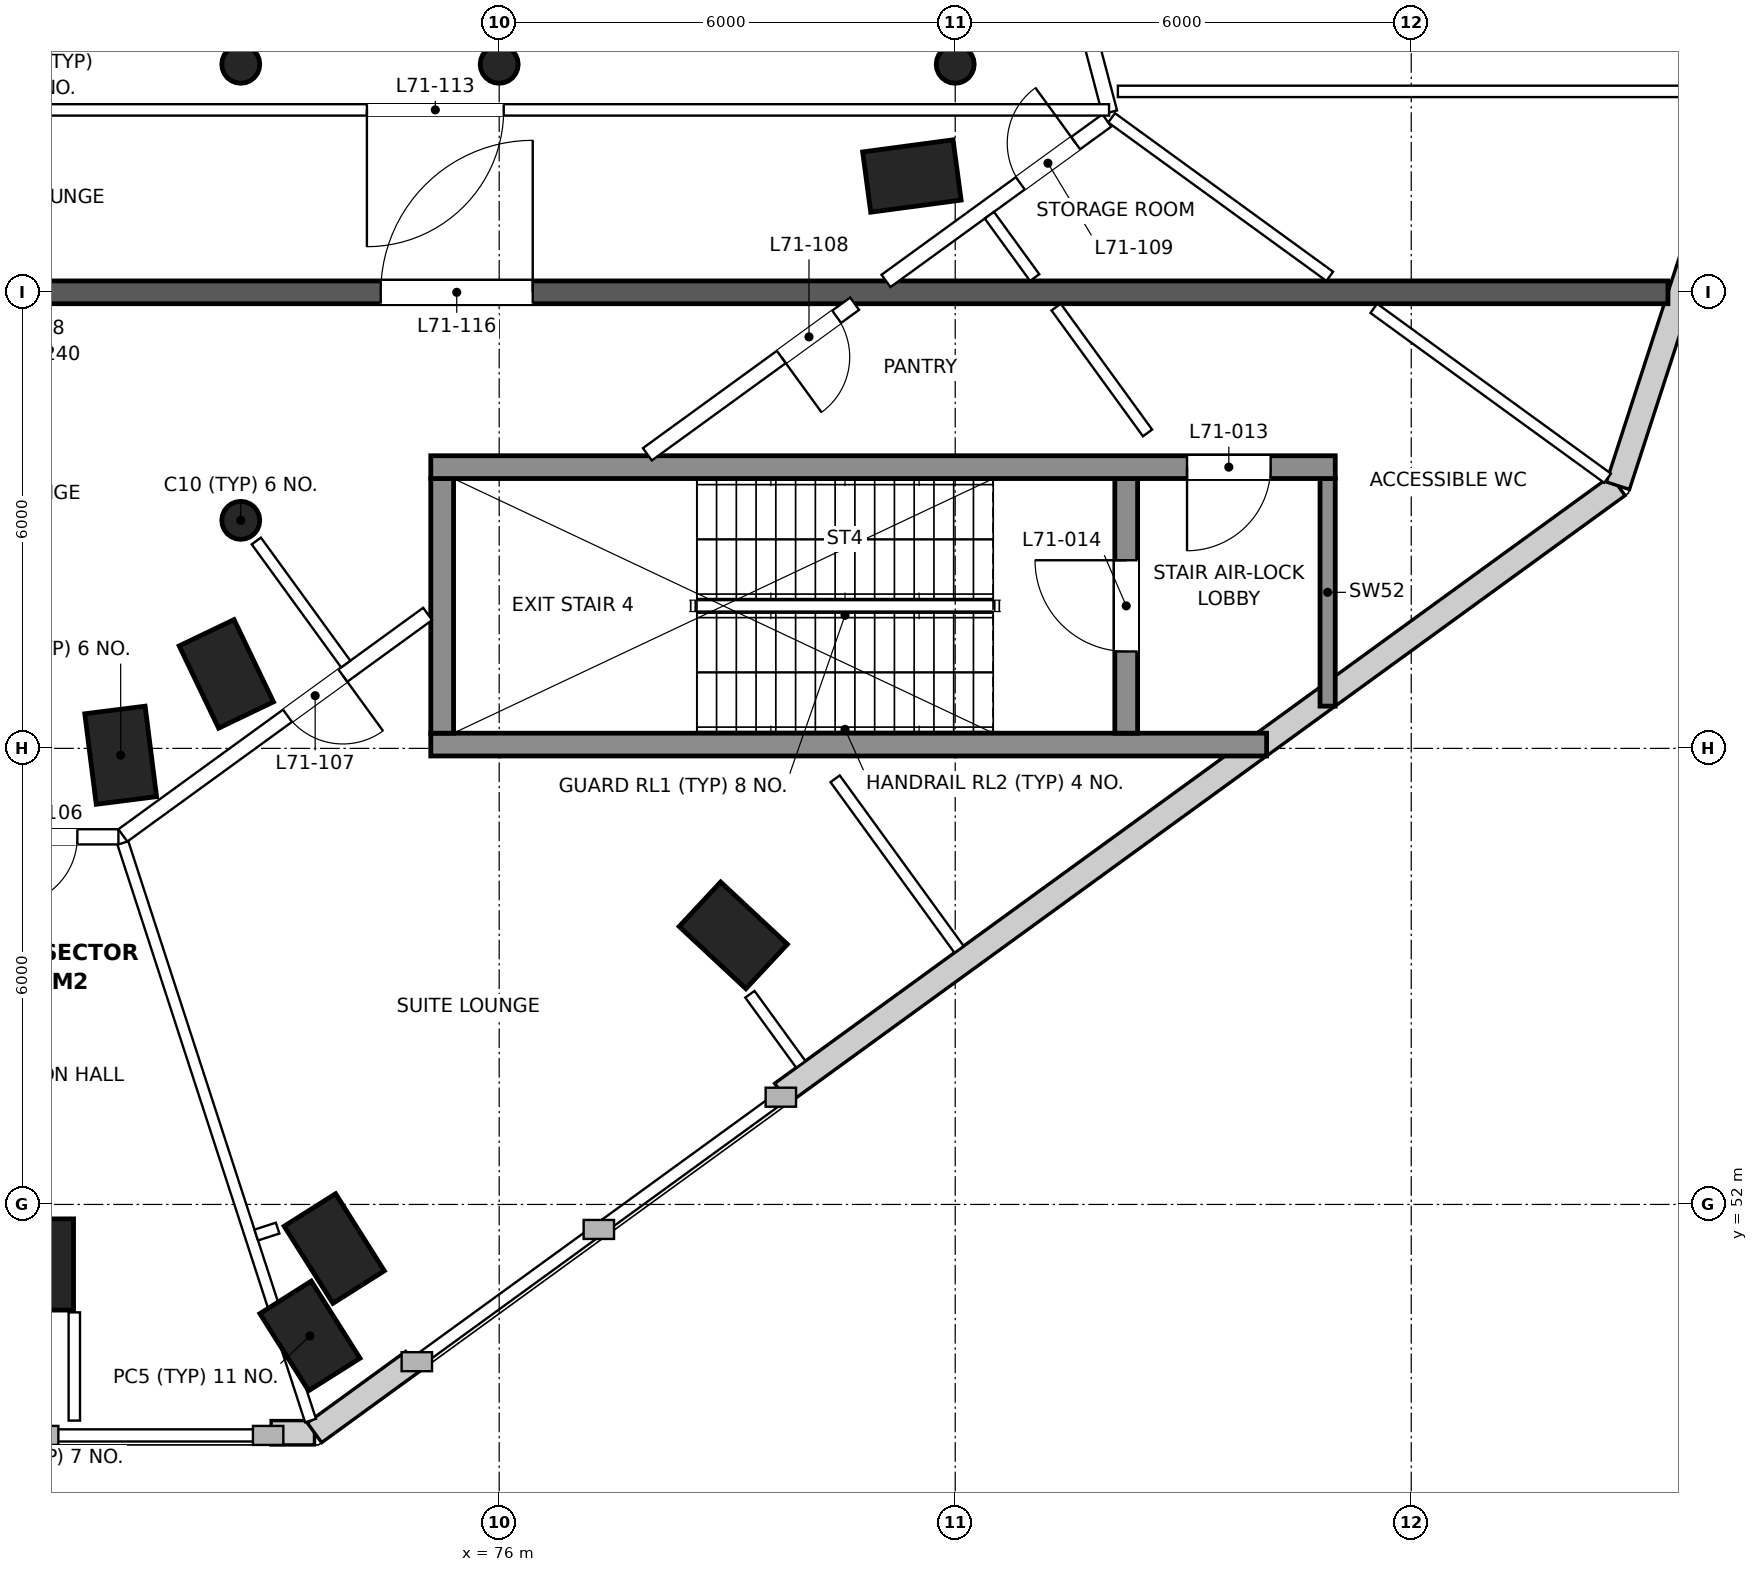
"""IFC4 building model, lengths in metres.
Left out: names, types, materials, properties, quantities, classifications, styles, units other than length and angle.
Written with IfcOpenShell. Run it as: python <this file> out.ifc"""

import sys

from ifc_helpers import new_model, si_unit, direction, frame, frame_2d, origin, origin_2d, place, context, subcontext, project, spatial, rectangle, circle, extrude, element, fill, save


model = new_model("IFC4")
c1 = context("Model", 3, precision=1e-05, world=origin(), true_north=direction((0.0, 1.0)))
c2 = subcontext(c1, "Body", "Model", "MODEL_VIEW")
j1 = project(units=[si_unit("LENGTHUNIT", "METRE"), si_unit("PLANEANGLEUNIT", "RADIAN")], contexts=[c1])
p1 = place(None, origin())
s1 = spatial("IfcSite", under=j1, at=p1, CompositionType="ELEMENT")
p2 = place(p1, origin())
s2 = spatial("IfcBuilding", under=s1, at=p2, CompositionType="ELEMENT")
p3 = place(p2, frame((0.0, 0.0, 300.1)))
s3 = spatial("IfcBuildingStorey", under=s2, at=p3, CompositionType="ELEMENT", Elevation=300.1)
for number, where, z_axis, x_axis in (
    (1, (70.0, 51.21, 0.0), (0.0, 0.0, 1.0), (-1.0, 0.0, 0.0)),
    (2, (73.51, 50.27, 0.0), (0.0, 0.0, 1.0), (-0.845, -0.534, 0.0)),
    (3, (73.83, 51.42, 0.0), (0.0, 0.0, 1.0), (-0.845, -0.534, 0.0)),
    (4, (79.08, 55.54, 0.0), (0.0, 0.0, 1.0), (-0.682, -0.731, 0.0)),
    (5, (71.02, 57.91, 0.0), (0.0, 0.0, 1.0), (-0.992, -0.126, 0.0)),
    (6, (72.41, 58.98, 0.0), (0.0, 0.0, 1.0), (-0.902, -0.432, 0.0)),
    (7, (81.43, 65.53, 0.0), (0.0, 0.0, 1.0), (0.133, -0.991, 0.0)),
):
    element("IfcColumn", number, at=place(p3, frame(where, z_axis=z_axis, x_axis=x_axis)), inside=s3, PredefinedType="COLUMN", context=c2, shape_type="SweptSolid", body=[
        extrude(rectangle(XDim=0.8, YDim=1.2, at=origin_2d()), origin(), (0.0, 0.0, 1.0), 6.0),
    ])
for number, where, z_axis, x_axis in (
    (8, (72.6, 61.0, 0.0), (0.0, 0.0, 1.0), (1.0, 0.0, 0.0)),
    (9, (72.6, 67.0, 0.0), (0.0, 0.0, 1.0), (1.0, 0.0, 0.0)),
    (10, (76.0, 67.0, 0.0), (0.0, 0.0, 1.0), (1.0, 0.0, 0.0)),
    (11, (82.0, 67.0, 0.0), (0.0, 0.0, 1.0), (1.0, 0.0, 0.0)),
):
    element("IfcColumn", number, at=place(p3, frame(where, z_axis=z_axis, x_axis=x_axis)), inside=s3, PredefinedType="COLUMN", context=c2, shape_type="SweptSolid", body=[
        extrude(circle(Radius=0.25, at=origin_2d()), origin(), (0.0, 0.0, 1.0), 6.0),
    ])
p4 = place(p3, frame((73.0, 48.996, 0.0), z_axis=(0.0, 0.0, 1.0), x_axis=(1.0, 0.0, 0.0)))
e12 = element("IfcWall", 12, at=p4, inside=s3, PredefinedType="SOLIDWALL", context=c2, shape_type="SweptSolid", body=[
    extrude(rectangle(XDim=0.57, YDim=0.32, at=frame_2d((0.285, 0.0))), origin(), (0.0, 0.0, 1.0), 5.7),
])
p5 = place(p3, frame((73.57, 48.996, 0.0), z_axis=(0.0, 0.0, 1.0), x_axis=(0.809033137517, 0.587763032522, 0.0)))
e13 = element("IfcWall", 13, at=p5, inside=s3, PredefinedType="SOLIDWALL", context=c2, shape_type="SweptSolid", body=[
    extrude(rectangle(XDim=1.599, YDim=0.32, at=frame_2d((0.799, 0.0))), origin(), (0.0, 0.0, 1.0), 5.7),
])
p6 = place(p3, frame((79.718, 53.463, 0.0), z_axis=(0.0, 0.0, 1.0), x_axis=(0.809018581772, 0.587783067422, 0.0)))
e14 = element("IfcWall", 14, at=p6, inside=s3, PredefinedType="SOLIDWALL", context=c2, shape_type="SweptSolid", body=[
    extrude(rectangle(XDim=13.599, YDim=0.32, at=frame_2d((6.799, 0.0))), origin(), (0.0, 0.0, 1.0), 5.7),
])
p7 = place(p3, frame((90.719, 61.456, 0.0), z_axis=(0.0, 0.0, 1.0), x_axis=(0.30900814357, 0.951059392051, 0.0)))
e15 = element("IfcWall", 15, at=p7, inside=s3, PredefinedType="SOLIDWALL", context=c2, shape_type="SweptSolid", body=[
    extrude(rectangle(XDim=5.455, YDim=0.32, at=frame_2d((2.727, 0.0))), origin(), (0.0, 0.0, 1.0), 5.7),
])
p8 = place(p3, frame((75.1, 58.05, 0.0), z_axis=(0.0, 0.0, 1.0), x_axis=(1.0, 0.0, 0.0)))
e16 = element("IfcWall", 16, at=p8, inside=s3, PredefinedType="SHEAR", context=c2, shape_type="SweptSolid", body=[
    extrude(rectangle(XDim=10.997, YDim=0.3, at=frame_2d((5.499, 0.0))), origin(), (0.0, 0.0, 1.0), 6.0),
])
p9 = place(p3, frame((75.25, 58.2, 0.0), z_axis=(0.0, 0.0, 1.0), x_axis=(0.0, 1.0, 0.0)))
e17 = element("IfcWall", 17, at=p9, inside=s3, PredefinedType="SHEAR", context=c2, shape_type="SweptSolid", body=[
    extrude(rectangle(XDim=3.35, YDim=0.3, at=frame_2d((1.675, 0.0))), origin(), (0.0, 0.0, 1.0), 6.0),
])
p10 = place(p3, frame((84.25, 58.2, 0.0), z_axis=(0.0, 0.0, 1.0), x_axis=(0.0, 1.0, 0.0)))
e18 = element("IfcWall", 18, at=p10, inside=s3, PredefinedType="SHEAR", context=c2, shape_type="SweptSolid", body=[
    extrude(rectangle(XDim=3.35, YDim=0.3, at=frame_2d((1.675, 0.0))), origin(), (0.0, 0.0, 1.0), 6.0),
])
p11 = place(p10, frame((1.075, 0.0, 0.0)))
e19 = element("IfcOpeningElement", 19, at=p11, cuts=e18, PredefinedType="OPENING", context=c2, shape_type="SweptSolid", body=[
    extrude(rectangle(XDim=1.2, YDim=2.1, at=frame_2d((0.6, 1.05))), frame((0.0, 0.16, 0.0), z_axis=(0.0, -1.0, 0.0), x_axis=(1.0, 0.0, 0.0)), (0.0, 0.0, 1.0), 0.32),
])
p12 = place(p3, frame((86.9, 58.556, 0.0), z_axis=(0.0, 0.0, 1.0), x_axis=(0.0, 1.0, 0.0)))
e20 = element("IfcWall", 20, at=p12, inside=s3, PredefinedType="SHEAR", context=c2, shape_type="SweptSolid", body=[
    extrude(rectangle(XDim=2.994, YDim=0.2, at=frame_2d((1.497, 0.0))), origin(), (0.0, 0.0, 1.0), 6.0),
])
p13 = place(p3, frame((75.1, 61.7, 0.0), z_axis=(0.0, 0.0, 1.0), x_axis=(1.0, 0.0, 0.0)))
e21 = element("IfcWall", 21, at=p13, inside=s3, PredefinedType="SHEAR", context=c2, shape_type="SweptSolid", body=[
    extrude(rectangle(XDim=11.9, YDim=0.3, at=frame_2d((5.95, 0.0))), origin(), (0.0, 0.0, 1.0), 6.0),
])
p14 = place(p13, frame((9.95, 0.0, 0.0)))
e22 = element("IfcOpeningElement", 22, at=p14, cuts=e21, PredefinedType="OPENING", context=c2, shape_type="SweptSolid", body=[
    extrude(rectangle(XDim=1.1, YDim=2.1, at=frame_2d((0.55, 1.05))), frame((0.0, 0.16, 0.0), z_axis=(0.0, -1.0, 0.0), x_axis=(1.0, 0.0, 0.0)), (0.0, 0.0, 1.0), 0.32),
])
p15 = place(p3, frame((48.622, 64.0, 0.0), z_axis=(0.0, 0.0, 1.0), x_axis=(1.0, 0.0, 0.0)))
e23 = element("IfcWall", 23, at=p15, inside=s3, PredefinedType="PARTITIONING", context=c2, shape_type="SweptSolid", body=[
    extrude(rectangle(XDim=42.755, YDim=0.3, at=frame_2d((21.378, 0.0))), origin(), (0.0, 0.0, 1.0), 5.2),
])
p16 = place(p15, frame((8.541, 0.0, 0.0)))
e24 = element("IfcOpeningElement", 24, at=p16, cuts=e23, PredefinedType="OPENING", context=c2, shape_type="SweptSolid", body=[
    extrude(rectangle(XDim=0.9, YDim=2.1, at=frame_2d((0.45, 1.05))), frame((0.0, 0.16, 0.0), z_axis=(0.0, -1.0, 0.0), x_axis=(1.0, 0.0, 0.0)), (0.0, 0.0, 1.0), 0.32),
])
p17 = place(p15, frame((14.936, 0.0, 0.0)))
e25 = element("IfcOpeningElement", 25, at=p17, cuts=e23, PredefinedType="OPENING", context=c2, shape_type="SweptSolid", body=[
    extrude(rectangle(XDim=2.0, YDim=2.1, at=frame_2d((1.0, 1.05))), frame((0.0, 0.16, 0.0), z_axis=(0.0, -1.0, 0.0), x_axis=(1.0, 0.0, 0.0)), (0.0, 0.0, 1.0), 0.32),
])
p18 = place(p15, frame((25.819, 0.0, 0.0)))
e26 = element("IfcOpeningElement", 26, at=p18, cuts=e23, PredefinedType="OPENING", context=c2, shape_type="SweptSolid", body=[
    extrude(rectangle(XDim=2.0, YDim=2.1, at=frame_2d((1.0, 1.05))), frame((0.0, 0.16, 0.0), z_axis=(0.0, -1.0, 0.0), x_axis=(1.0, 0.0, 0.0)), (0.0, 0.0, 1.0), 0.32),
])
p19 = place(p3, frame((83.103, 69.897, 0.0), z_axis=(0.0, 0.0, 1.0), x_axis=(0.254618397002, -0.967041608158, 0.0)))
e27 = element("IfcWall", 27, at=p19, inside=s3, PredefinedType="PARTITIONING", context=c2, shape_type="SweptSolid", body=[
    extrude(rectangle(XDim=3.65, YDim=0.2, at=frame_2d((1.825, 0.0))), origin(), (0.0, 0.0, 1.0), 5.7),
])
p20 = place(p3, frame((83.995, 66.261, 0.0), z_axis=(0.0, 0.0, 1.0), x_axis=(-0.809026987684, -0.587771497437, 0.0)))
e28 = element("IfcWall", 28, at=p20, inside=s3, PredefinedType="PARTITIONING", context=c2, shape_type="SweptSolid", body=[
    extrude(rectangle(XDim=3.592, YDim=0.2, at=frame_2d((1.796, 0.0))), origin(), (0.0, 0.0, 1.0), 5.2),
])
p21 = place(p20, frame((0.507, 0.0, 0.0)))
e29 = element("IfcOpeningElement", 29, at=p21, cuts=e28, PredefinedType="OPENING", context=c2, shape_type="SweptSolid", body=[
    extrude(rectangle(XDim=0.9, YDim=2.1, at=frame_2d((0.45, 1.05))), frame((0.0, 0.11, 0.0), z_axis=(0.0, -1.0, 0.0), x_axis=(1.0, 0.0, 0.0)), (0.0, 0.0, 1.0), 0.22),
])
p22 = place(p3, frame((80.676, 63.85, 0.0), z_axis=(0.0, 0.0, 1.0), x_axis=(-0.809017922832, -0.587783974379, 0.0)))
e30 = element("IfcWall", 30, at=p22, inside=s3, PredefinedType="PARTITIONING", context=c2, shape_type="SweptSolid", body=[
    extrude(rectangle(XDim=3.37, YDim=0.2, at=frame_2d((1.685, 0.0))), origin(), (0.0, 0.0, 1.0), 5.7),
])
p23 = place(p22, frame((0.292, 0.0, 0.0)))
e31 = element("IfcOpeningElement", 31, at=p23, cuts=e30, PredefinedType="OPENING", context=c2, shape_type="SweptSolid", body=[
    extrude(rectangle(XDim=0.9, YDim=2.1, at=frame_2d((0.45, 1.05))), frame((0.0, 0.11, 0.0), z_axis=(0.0, -1.0, 0.0), x_axis=(1.0, 0.0, 0.0)), (0.0, 0.0, 1.0), 0.22),
])
p24 = place(p3, frame((75.059, 59.769, 0.0), z_axis=(0.0, 0.0, 1.0), x_axis=(-0.809010774922, -0.587793812539, 0.0)))
e32 = element("IfcWall", 32, at=p24, inside=s3, PredefinedType="PARTITIONING", context=c2, shape_type="SweptSolid", body=[
    extrude(rectangle(XDim=4.956, YDim=0.2, at=frame_2d((2.478, 0.0))), origin(), (0.0, 0.0, 1.0), 5.2),
])
p25 = place(p24, frame((1.379, 0.0, 0.0)))
e33 = element("IfcOpeningElement", 33, at=p25, cuts=e32, PredefinedType="OPENING", context=c2, shape_type="SweptSolid", body=[
    extrude(rectangle(XDim=0.9, YDim=2.1, at=frame_2d((0.45, 1.05))), frame((0.0, 0.11, 0.0), z_axis=(0.0, -1.0, 0.0), x_axis=(1.0, 0.0, 0.0)), (0.0, 0.0, 1.0), 0.22),
])
p26 = place(p3, frame((70.99, 56.836, 0.0), z_axis=(0.0, 0.0, 1.0), x_axis=(-1.0, 0.0, 0.0)))
e34 = element("IfcWall", 34, at=p26, inside=s3, PredefinedType="PARTITIONING", context=c2, shape_type="SweptSolid", body=[
    extrude(rectangle(XDim=1.98, YDim=0.2, at=frame_2d((0.99, 0.0))), origin(), (0.0, 0.0, 1.0), 5.7),
])
p27 = place(p26, frame((0.54, 0.0, 0.0)))
e35 = element("IfcOpeningElement", 35, at=p27, cuts=e34, PredefinedType="OPENING", context=c2, shape_type="SweptSolid", body=[
    extrude(rectangle(XDim=0.9, YDim=2.1, at=frame_2d((0.45, 1.05))), frame((0.0, 0.11, 0.0), z_axis=(0.0, -1.0, 0.0), x_axis=(1.0, 0.0, 0.0)), (0.0, 0.0, 1.0), 0.22),
])
p28 = place(p3, frame((73.518, 49.156, 0.0), z_axis=(0.0, 0.0, 1.0), x_axis=(-0.309004544659, 0.951060561363, 0.0)))
e36 = element("IfcWall", 36, at=p28, inside=s3, PredefinedType="PARTITIONING", context=c2, shape_type="SweptSolid", body=[
    extrude(rectangle(XDim=7.99, YDim=0.15, at=frame_2d((3.995, 0.0))), origin(), (0.0, 0.0, 1.0), 5.7),
])
p29 = place(p3, frame((90.583, 61.555, 0.0), z_axis=(0.0, 0.0, 1.0), x_axis=(-0.808994279643, 0.587816515168, 0.0)))
e37 = element("IfcWall", 37, at=p29, inside=s3, PredefinedType="PARTITIONING", context=c2, shape_type="SweptSolid", body=[
    extrude(rectangle(XDim=3.802, YDim=0.15, at=frame_2d((1.901, 0.0))), origin(), (0.0, 0.0, 1.0), 5.25),
])
p30 = place(p3, frame((86.927, 64.211, 0.0), z_axis=(0.0, 0.0, 1.0), x_axis=(-0.809009822352, 0.587795123608, 0.0)))
e38 = element("IfcWall", 38, at=p30, inside=s3, PredefinedType="PARTITIONING", context=c2, shape_type="SweptSolid", body=[
    extrude(rectangle(XDim=3.547, YDim=0.15, at=frame_2d((1.773, 0.0))), origin(), (0.0, 0.0, 1.0), 5.7),
])
p31 = place(p3, frame((92.237, 66.644, 0.0), z_axis=(0.0, 0.0, 1.0), x_axis=(-1.0, 0.0, 0.0)))
e39 = element("IfcWall", 39, at=p31, inside=s3, PredefinedType="PARTITIONING", context=c2, shape_type="SweptSolid", body=[
    extrude(rectangle(XDim=8.096, YDim=0.15, at=frame_2d((4.048, 0.0))), origin(), (0.0, 0.0, 1.0), 5.25),
])
p32 = place(p3, frame((82.051, 55.355, 0.0), z_axis=(0.0, 0.0, 1.0), x_axis=(-0.58773733182, 0.809051808468, 0.0)))
e40 = element("IfcWall", 40, at=p32, inside=s3, PredefinedType="PARTITIONING", context=c2, shape_type="SweptSolid", body=[
    extrude(rectangle(XDim=2.774, YDim=0.15, at=frame_2d((1.387, 0.0))), origin(), (0.0, 0.0, 1.0), 5.7),
])
p33 = place(p3, frame((84.531, 62.15, 0.0), z_axis=(0.0, 0.0, 1.0), x_axis=(-0.587774481837, 0.80902481946, 0.0)))
e41 = element("IfcWall", 41, at=p33, inside=s3, PredefinedType="PARTITIONING", context=c2, shape_type="SweptSolid", body=[
    extrude(rectangle(XDim=2.047, YDim=0.15, at=frame_2d((1.023, 0.0))), origin(), (0.0, 0.0, 1.0), 5.7),
])
p34 = place(p3, frame((83.045, 64.194, 0.0), z_axis=(0.0, 0.0, 1.0), x_axis=(-0.587799519818, 0.809006628218, 0.0)))
e42 = element("IfcWall", 42, at=p34, inside=s3, PredefinedType="PARTITIONING", context=c2, shape_type="SweptSolid", body=[
    extrude(rectangle(XDim=1.014, YDim=0.15, at=frame_2d((0.507, 0.0))), origin(), (0.0, 0.0, 1.0), 5.7),
])
p35 = place(p3, frame((84.024, 66.4, 0.0), z_axis=(0.0, 0.0, 1.0), x_axis=(-1.0, 0.0, 0.0)))
e43 = element("IfcWall", 43, at=p35, inside=s3, PredefinedType="PARTITIONING", context=c2, shape_type="SweptSolid", body=[
    extrude(rectangle(XDim=28.048, YDim=0.15, at=frame_2d((14.024, 0.0))), origin(), (0.0, 0.0, 1.0), 5.7),
])
p36 = place(p35, frame((7.965, 0.0, 0.0)))
e44 = element("IfcOpeningElement", 44, at=p36, cuts=e43, PredefinedType="OPENING", context=c2, shape_type="SweptSolid", body=[
    extrude(rectangle(XDim=1.8, YDim=2.1, at=frame_2d((0.9, 1.05))), frame((0.0, 0.085, 0.0), z_axis=(0.0, -1.0, 0.0), x_axis=(1.0, 0.0, 0.0)), (0.0, 0.0, 1.0), 0.17),
])
p37 = place(p35, frame((18.284, 0.0, 0.0)))
e45 = element("IfcOpeningElement", 45, at=p37, cuts=e43, PredefinedType="OPENING", context=c2, shape_type="SweptSolid", body=[
    extrude(rectangle(XDim=1.8, YDim=2.1, at=frame_2d((0.9, 1.05))), frame((0.0, 0.085, 0.0), z_axis=(0.0, -1.0, 0.0), x_axis=(1.0, 0.0, 0.0)), (0.0, 0.0, 1.0), 0.17),
])
p38 = place(p3, frame((70.41, 50.58, 0.0), z_axis=(0.0, 0.0, 1.0), x_axis=(0.0, -1.0, 0.0)))
e46 = element("IfcWall", 46, at=p38, inside=s3, PredefinedType="PARTITIONING", context=c2, shape_type="SweptSolid", body=[
    extrude(rectangle(XDim=1.424, YDim=0.15, at=frame_2d((0.712, 0.0))), origin(), (0.0, 0.0, 1.0), 5.7),
])
p39 = place(p3, frame((73.085, 51.689, 0.0), z_axis=(0.0, 0.0, 1.0), x_axis=(-0.951052283617, -0.309030020915, 0.0)))
e47 = element("IfcWall", 47, at=p39, inside=s3, PredefinedType="PARTITIONING", context=c2, shape_type="SweptSolid", body=[
    extrude(rectangle(XDim=0.295, YDim=0.15, at=frame_2d((0.148, 0.0))), origin(), (0.0, 0.0, 1.0), 5.7),
])
p40 = place(p3, frame((79.299, 54.765, 0.0), z_axis=(0.0, 0.0, 1.0), x_axis=(0.587802397039, -0.80900453771, 0.0)))
e48 = element("IfcWall", 48, at=p40, inside=s3, PredefinedType="PARTITIONING", context=c2, shape_type="SweptSolid", body=[
    extrude(rectangle(XDim=1.14, YDim=0.15, at=frame_2d((0.57, 0.0))), origin(), (0.0, 0.0, 1.0), 5.7),
])
p41 = place(p3, frame((72.805, 60.729, 0.0), z_axis=(0.0, 0.0, 1.0), x_axis=(0.587830755478, -0.80898393242, 0.0)))
e49 = element("IfcWall", 49, at=p41, inside=s3, PredefinedType="PARTITIONING", context=c2, shape_type="SweptSolid", body=[
    extrude(rectangle(XDim=2.001, YDim=0.15, at=frame_2d((1.001, 0.0))), origin(), (0.0, 0.0, 1.0), 5.7),
])
p42 = place(p14, frame((1.1, 0.0, 0.0), z_axis=(0.0, 0.0, 1.0), x_axis=(-1.0, 0.0, 0.0)))
e50 = element("IfcDoor", 50, at=p42, inside=s3, OperationType="SINGLE_SWING_RIGHT", PredefinedType="DOOR", context=c2, shape_type="SweptSolid", body=[
    extrude(rectangle(XDim=1.1, YDim=2.1, at=frame_2d((0.55, 1.05))), frame((0.0, 0.025, 0.0), z_axis=(0.0, -1.0, 0.0), x_axis=(1.0, 0.0, 0.0)), (0.0, 0.0, 1.0), 0.05),
])
fill(e22, e50)
p43 = place(p11, origin())
e51 = element("IfcDoor", 51, at=p43, inside=s3, OperationType="SINGLE_SWING_RIGHT", PredefinedType="DOOR", context=c2, shape_type="SweptSolid", body=[
    extrude(rectangle(XDim=1.2, YDim=2.1, at=frame_2d((0.6, 1.05))), frame((0.0, 0.025, 0.0), z_axis=(0.0, -1.0, 0.0), x_axis=(1.0, 0.0, 0.0)), (0.0, 0.0, 1.0), 0.05),
])
fill(e19, e51)
p44 = place(p27, origin())
e52 = element("IfcDoor", 52, at=p44, inside=s3, OperationType="SINGLE_SWING_RIGHT", PredefinedType="DOOR", context=c2, shape_type="SweptSolid", body=[
    extrude(rectangle(XDim=0.9, YDim=2.1, at=frame_2d((0.45, 1.05))), frame((0.0, 0.025, 0.0), z_axis=(0.0, -1.0, 0.0), x_axis=(1.0, 0.0, 0.0)), (0.0, 0.0, 1.0), 0.05),
])
fill(e35, e52)
p45 = place(p25, origin())
e53 = element("IfcDoor", 53, at=p45, inside=s3, OperationType="SINGLE_SWING_LEFT", PredefinedType="DOOR", context=c2, shape_type="SweptSolid", body=[
    extrude(rectangle(XDim=0.9, YDim=2.1, at=frame_2d((0.45, 1.05))), frame((0.0, 0.025, 0.0), z_axis=(0.0, -1.0, 0.0), x_axis=(1.0, 0.0, 0.0)), (0.0, 0.0, 1.0), 0.05),
])
fill(e33, e53)
p46 = place(p23, origin())
e54 = element("IfcDoor", 54, at=p46, inside=s3, OperationType="SINGLE_SWING_RIGHT", PredefinedType="DOOR", context=c2, shape_type="SweptSolid", body=[
    extrude(rectangle(XDim=0.9, YDim=2.1, at=frame_2d((0.45, 1.05))), frame((0.0, 0.025, 0.0), z_axis=(0.0, -1.0, 0.0), x_axis=(1.0, 0.0, 0.0)), (0.0, 0.0, 1.0), 0.05),
])
fill(e31, e54)
p47 = place(p21, frame((0.9, 0.0, 0.0), z_axis=(0.0, 0.0, 1.0), x_axis=(-1.0, 0.0, 0.0)))
e55 = element("IfcDoor", 55, at=p47, inside=s3, OperationType="SINGLE_SWING_RIGHT", PredefinedType="DOOR", context=c2, shape_type="SweptSolid", body=[
    extrude(rectangle(XDim=0.9, YDim=2.1, at=frame_2d((0.45, 1.05))), frame((0.0, 0.025, 0.0), z_axis=(0.0, -1.0, 0.0), x_axis=(1.0, 0.0, 0.0)), (0.0, 0.0, 1.0), 0.05),
])
fill(e29, e55)
p48 = place(p36, origin())
e56 = element("IfcDoor", 56, at=p48, inside=s3, OperationType="DOUBLE_DOOR_SINGLE_SWING", PredefinedType="DOOR", context=c2, shape_type="SweptSolid", body=[
    extrude(rectangle(XDim=1.8, YDim=2.1, at=frame_2d((0.9, 1.05))), frame((0.0, 0.025, 0.0), z_axis=(0.0, -1.0, 0.0), x_axis=(1.0, 0.0, 0.0)), (0.0, 0.0, 1.0), 0.05),
])
fill(e44, e56)
p49 = place(p18, origin())
e57 = element("IfcDoor", 57, at=p49, inside=s3, OperationType="DOUBLE_DOOR_SINGLE_SWING", PredefinedType="DOOR", context=c2, shape_type="SweptSolid", body=[
    extrude(rectangle(XDim=2.0, YDim=2.1, at=frame_2d((1.0, 1.05))), frame((0.0, 0.025, 0.0), z_axis=(0.0, -1.0, 0.0), x_axis=(1.0, 0.0, 0.0)), (0.0, 0.0, 1.0), 0.05),
])
fill(e26, e57)
save(model, sys.argv[1])
